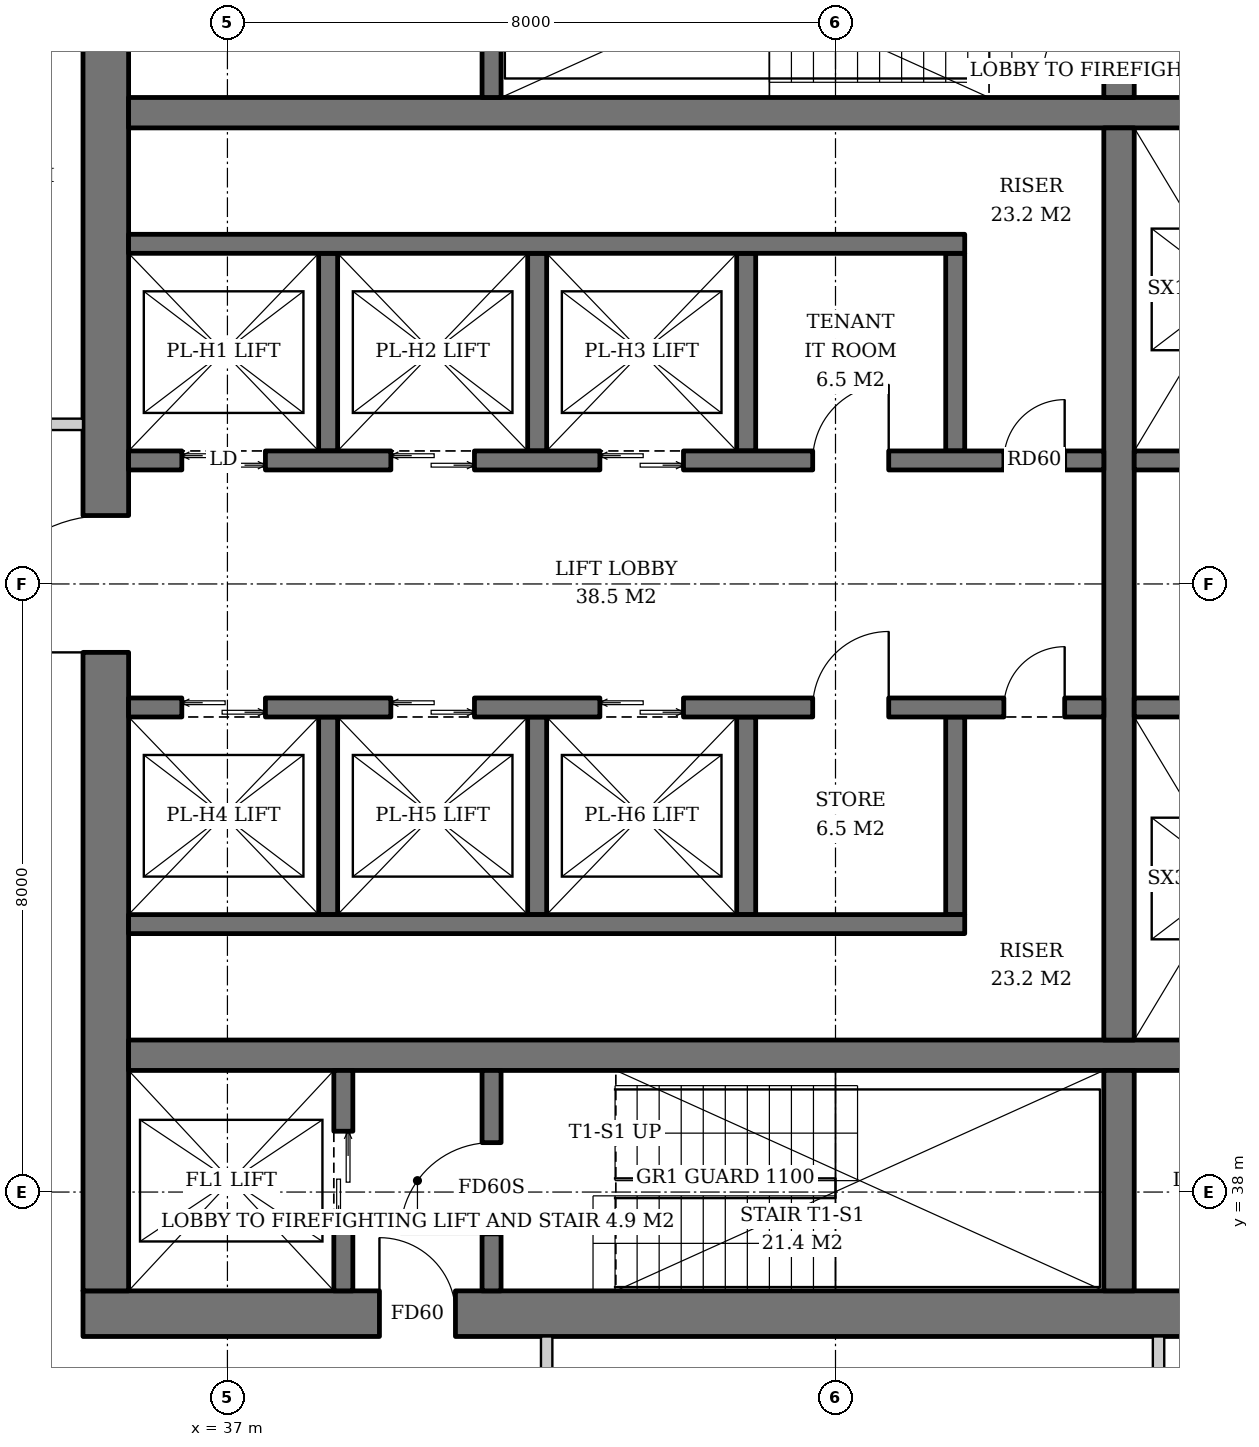
"""IFC4 building model, lengths in metres.
Left out: names, types, materials, properties, quantities, classifications, styles, units other than length and angle.
Written with IfcOpenShell. Run it as: python <this file> out.ifc"""

import sys

from ifc_helpers import new_model, si_unit, direction, frame, frame_2d, origin, place, context, subcontext, project, spatial, rectangle, extrude, element, fill, save


model = new_model("IFC4")
c1 = context("Model", 3, precision=1e-05, world=origin(), true_north=direction((0.0, 1.0)))
c2 = subcontext(c1, "Body", "Model", "MODEL_VIEW")
j1 = project(units=[si_unit("LENGTHUNIT", "METRE"), si_unit("PLANEANGLEUNIT", "RADIAN")], contexts=[c1])
p1 = place(None, origin())
s1 = spatial("IfcSite", under=j1, at=p1, CompositionType="ELEMENT")
p2 = place(p1, origin())
s2 = spatial("IfcBuilding", under=s1, at=p2, CompositionType="ELEMENT")
p3 = place(p2, frame((0.0, 0.0, 203.4)))
s3 = spatial("IfcBuildingStorey", under=s2, at=p3, CompositionType="ELEMENT", Elevation=203.4)
p4 = place(p3, frame((35.1, 36.4, 0.0), z_axis=(0.0, 0.0, 1.0), x_axis=(1.0, 0.0, 0.0)))
e1 = element("IfcWall", 1, at=p4, inside=s3, PredefinedType="SHEAR", context=c2, shape_type="SweptSolid", body=[
    extrude(rectangle(XDim=19.8, YDim=0.6, at=frame_2d((9.9, 0.0))), origin(), (0.0, 0.0, 1.0), 3.8),
])
p5 = place(p4, frame((3.9, 0.0, 0.0)))
e2 = element("IfcOpeningElement", 2, at=p5, cuts=e1, PredefinedType="OPENING", context=c2, shape_type="SweptSolid", body=[
    extrude(rectangle(XDim=1.0, YDim=2.1, at=frame_2d((0.5, 1.05))), frame((0.0, 0.31, 0.0), z_axis=(0.0, -1.0, 0.0), x_axis=(1.0, 0.0, 0.0)), (0.0, 0.0, 1.0), 0.62),
])
p6 = place(p4, frame((15.35, 0.0, 0.0)))
e3 = element("IfcOpeningElement", 3, at=p6, cuts=e1, PredefinedType="OPENING", context=c2, shape_type="SweptSolid", body=[
    extrude(rectangle(XDim=1.0, YDim=2.1, at=frame_2d((0.5, 1.05))), frame((0.0, 0.31, 0.0), z_axis=(0.0, -1.0, 0.0), x_axis=(1.0, 0.0, 0.0)), (0.0, 0.0, 1.0), 0.62),
])
p7 = place(p3, frame((35.4, 36.7, 0.0), z_axis=(0.0, 0.0, 1.0), x_axis=(0.0, 1.0, 0.0)))
e4 = element("IfcWall", 4, at=p7, inside=s3, PredefinedType="SHEAR", context=c2, shape_type="SweptSolid", body=[
    extrude(rectangle(XDim=18.6, YDim=0.6, at=frame_2d((9.3, 0.0))), origin(), (0.0, 0.0, 1.0), 3.8),
])
p8 = place(p7, frame((8.4, 0.0, 0.0)))
e5 = element("IfcOpeningElement", 5, at=p8, cuts=e4, PredefinedType="OPENING", context=c2, shape_type="SweptSolid", body=[
    extrude(rectangle(XDim=1.8, YDim=2.4, at=frame_2d((0.9, 1.2))), frame((0.0, 0.31, 0.0), z_axis=(0.0, -1.0, 0.0), x_axis=(1.0, 0.0, 0.0)), (0.0, 0.0, 1.0), 0.62),
])
for number, where, z_axis, x_axis in (
    (6, (35.7, 39.8, 0.0), (0.0, 0.0, 1.0), (1.0, 0.0, 0.0)),
    (7, (35.7, 52.2, 0.0), (0.0, 0.0, 1.0), (1.0, 0.0, 0.0)),
):
    element("IfcWall", number, at=place(p3, frame(where, z_axis=z_axis, x_axis=x_axis)), inside=s3, PredefinedType="SHEAR", context=c2, shape_type="SweptSolid", body=[
        extrude(rectangle(XDim=18.6, YDim=0.4, at=frame_2d((9.3, 0.0))), origin(), (0.0, 0.0, 1.0), 3.8),
    ])
p9 = place(p3, frame((48.73, 36.7, 0.0), z_axis=(0.0, 0.0, 1.0), x_axis=(0.0, 1.0, 0.0)))
e8 = element("IfcWall", 8, at=p9, inside=s3, PredefinedType="SHEAR", context=c2, shape_type="SweptSolid", body=[
    extrude(rectangle(XDim=2.9, YDim=0.4, at=frame_2d((1.45, 0.0))), origin(), (0.0, 0.0, 1.0), 3.8),
])
p10 = place(p3, frame((48.73, 40.0, 0.0), z_axis=(0.0, 0.0, 1.0), x_axis=(0.0, 1.0, 0.0)))
e9 = element("IfcWall", 9, at=p10, inside=s3, PredefinedType="SHEAR", context=c2, shape_type="SweptSolid", body=[
    extrude(rectangle(XDim=12.0, YDim=0.4, at=frame_2d((6.0, 0.0))), origin(), (0.0, 0.0, 1.0), 3.8),
])
p11 = place(p3, frame((48.73, 52.4, 0.0), z_axis=(0.0, 0.0, 1.0), x_axis=(0.0, 1.0, 0.0)))
e10 = element("IfcWall", 10, at=p11, inside=s3, PredefinedType="SHEAR", context=c2, shape_type="SweptSolid", body=[
    extrude(rectangle(XDim=2.9, YDim=0.4, at=frame_2d((1.45, 0.0))), origin(), (0.0, 0.0, 1.0), 3.8),
])
p12 = place(p11, frame((0.3, 0.0, 0.0)))
e11 = element("IfcOpeningElement", 11, at=p12, cuts=e10, PredefinedType="OPENING", context=c2, shape_type="SweptSolid", body=[
    extrude(rectangle(XDim=1.0, YDim=2.1, at=frame_2d((0.5, 1.05))), frame((0.0, 0.21, 0.0), z_axis=(0.0, -1.0, 0.0), x_axis=(1.0, 0.0, 0.0)), (0.0, 0.0, 1.0), 0.42),
])
p13 = place(p3, frame((38.525, 36.7, 0.0), z_axis=(0.0, 0.0, 1.0), x_axis=(0.0, 1.0, 0.0)))
e12 = element("IfcWall", 12, at=p13, inside=s3, PredefinedType="SHEAR", context=c2, shape_type="SweptSolid", body=[
    extrude(rectangle(XDim=2.9, YDim=0.25, at=frame_2d((1.45, 0.0))), origin(), (0.0, 0.0, 1.0), 3.8),
])
p14 = place(p13, frame((0.8, 0.0, 0.0)))
e13 = element("IfcOpeningElement", 13, at=p14, cuts=e12, PredefinedType="OPENING", context=c2, shape_type="SweptSolid", body=[
    extrude(rectangle(XDim=1.3, YDim=2.2, at=frame_2d((0.65, 1.1))), frame((0.0, 0.135, 0.0), z_axis=(0.0, -1.0, 0.0), x_axis=(1.0, 0.0, 0.0)), (0.0, 0.0, 1.0), 0.27),
])
p15 = place(p3, frame((40.475, 36.7, 0.0), z_axis=(0.0, 0.0, 1.0), x_axis=(0.0, 1.0, 0.0)))
e14 = element("IfcWall", 14, at=p15, inside=s3, PredefinedType="SHEAR", context=c2, shape_type="SweptSolid", body=[
    extrude(rectangle(XDim=2.9, YDim=0.25, at=frame_2d((1.45, 0.0))), origin(), (0.0, 0.0, 1.0), 3.8),
])
p16 = place(p15, frame((0.75, 0.0, 0.0)))
e15 = element("IfcOpeningElement", 15, at=p16, cuts=e14, PredefinedType="OPENING", context=c2, shape_type="SweptSolid", body=[
    extrude(rectangle(XDim=1.2, YDim=2.1, at=frame_2d((0.6, 1.05))), frame((0.0, 0.135, 0.0), z_axis=(0.0, -1.0, 0.0), x_axis=(1.0, 0.0, 0.0)), (0.0, 0.0, 1.0), 0.27),
])
p17 = place(p3, frame((40.475, 52.4, 0.0), z_axis=(0.0, 0.0, 1.0), x_axis=(0.0, 1.0, 0.0)))
e16 = element("IfcWall", 16, at=p17, inside=s3, PredefinedType="SHEAR", context=c2, shape_type="SweptSolid", body=[
    extrude(rectangle(XDim=2.9, YDim=0.25, at=frame_2d((1.45, 0.0))), origin(), (0.0, 0.0, 1.0), 3.8),
])
for number, where, z_axis, x_axis in (
    (17, (38.325, 47.75, 0.0), (0.0, 0.0, 1.0), (0.0, 1.0, 0.0)),
    (18, (41.075, 47.75, 0.0), (0.0, 0.0, 1.0), (0.0, 1.0, 0.0)),
    (19, (43.825, 47.75, 0.0), (0.0, 0.0, 1.0), (0.0, 1.0, 0.0)),
    (20, (46.575, 47.75, 0.0), (0.0, 0.0, 1.0), (0.0, 1.0, 0.0)),
):
    element("IfcWall", number, at=place(p3, frame(where, z_axis=z_axis, x_axis=x_axis)), inside=s3, PredefinedType="SHEAR", context=c2, shape_type="SweptSolid", body=[
        extrude(rectangle(XDim=2.6, YDim=0.25, at=frame_2d((1.3, 0.0))), origin(), (0.0, 0.0, 1.0), 3.8),
    ])
p18 = place(p3, frame((35.7, 50.475, 0.0), z_axis=(0.0, 0.0, 1.0), x_axis=(1.0, 0.0, 0.0)))
e21 = element("IfcWall", 21, at=p18, inside=s3, PredefinedType="SHEAR", context=c2, shape_type="SweptSolid", body=[
    extrude(rectangle(XDim=11.0, YDim=0.25, at=frame_2d((5.5, 0.0))), origin(), (0.0, 0.0, 1.0), 3.8),
])
p19 = place(p3, frame((35.7, 47.625, 0.0), z_axis=(0.0, 0.0, 1.0), x_axis=(1.0, 0.0, 0.0)))
e22 = element("IfcWall", 22, at=p19, inside=s3, PredefinedType="SHEAR", context=c2, shape_type="SweptSolid", body=[
    extrude(rectangle(XDim=12.83, YDim=0.25, at=frame_2d((6.415, 0.0))), origin(), (0.0, 0.0, 1.0), 3.8),
])
p20 = place(p19, frame((0.7, 0.0, 0.0)))
e23 = element("IfcOpeningElement", 23, at=p20, cuts=e22, PredefinedType="OPENING", context=c2, shape_type="SweptSolid", body=[
    extrude(rectangle(XDim=1.1, YDim=2.2, at=frame_2d((0.55, 1.1))), frame((0.0, 0.135, 0.0), z_axis=(0.0, -1.0, 0.0), x_axis=(1.0, 0.0, 0.0)), (0.0, 0.0, 1.0), 0.27),
])
p21 = place(p19, frame((3.45, 0.0, 0.0)))
e24 = element("IfcOpeningElement", 24, at=p21, cuts=e22, PredefinedType="OPENING", context=c2, shape_type="SweptSolid", body=[
    extrude(rectangle(XDim=1.1, YDim=2.2, at=frame_2d((0.55, 1.1))), frame((0.0, 0.135, 0.0), z_axis=(0.0, -1.0, 0.0), x_axis=(1.0, 0.0, 0.0)), (0.0, 0.0, 1.0), 0.27),
])
p22 = place(p19, frame((6.2, 0.0, 0.0)))
e25 = element("IfcOpeningElement", 25, at=p22, cuts=e22, PredefinedType="OPENING", context=c2, shape_type="SweptSolid", body=[
    extrude(rectangle(XDim=1.1, YDim=2.2, at=frame_2d((0.55, 1.1))), frame((0.0, 0.135, 0.0), z_axis=(0.0, -1.0, 0.0), x_axis=(1.0, 0.0, 0.0)), (0.0, 0.0, 1.0), 0.27),
])
p23 = place(p19, frame((9.0, 0.0, 0.0)))
e26 = element("IfcOpeningElement", 26, at=p23, cuts=e22, PredefinedType="OPENING", context=c2, shape_type="SweptSolid", body=[
    extrude(rectangle(XDim=1.0, YDim=2.1, at=frame_2d((0.5, 1.05))), frame((0.0, 0.135, 0.0), z_axis=(0.0, -1.0, 0.0), x_axis=(1.0, 0.0, 0.0)), (0.0, 0.0, 1.0), 0.27),
])
p24 = place(p19, frame((11.515, 0.0, 0.0)))
e27 = element("IfcOpeningElement", 27, at=p24, cuts=e22, PredefinedType="OPENING", context=c2, shape_type="SweptSolid", body=[
    extrude(rectangle(XDim=0.8, YDim=2.0, at=frame_2d((0.4, 1.0))), frame((0.0, 0.135, 0.0), z_axis=(0.0, -1.0, 0.0), x_axis=(1.0, 0.0, 0.0)), (0.0, 0.0, 1.0), 0.27),
])
for number, where, z_axis, x_axis in (
    (28, (38.325, 44.25, 0.0), (0.0, 0.0, 1.0), (0.0, -1.0, 0.0)),
    (29, (41.075, 44.25, 0.0), (0.0, 0.0, 1.0), (0.0, -1.0, 0.0)),
    (30, (43.825, 44.25, 0.0), (0.0, 0.0, 1.0), (0.0, -1.0, 0.0)),
    (31, (46.575, 44.25, 0.0), (0.0, 0.0, 1.0), (0.0, -1.0, 0.0)),
):
    element("IfcWall", number, at=place(p3, frame(where, z_axis=z_axis, x_axis=x_axis)), inside=s3, PredefinedType="SHEAR", context=c2, shape_type="SweptSolid", body=[
        extrude(rectangle(XDim=2.6, YDim=0.25, at=frame_2d((1.3, 0.0))), origin(), (0.0, 0.0, 1.0), 3.8),
    ])
p25 = place(p3, frame((35.7, 41.525, 0.0), z_axis=(0.0, 0.0, 1.0), x_axis=(1.0, 0.0, 0.0)))
e32 = element("IfcWall", 32, at=p25, inside=s3, PredefinedType="SHEAR", context=c2, shape_type="SweptSolid", body=[
    extrude(rectangle(XDim=11.0, YDim=0.25, at=frame_2d((5.5, 0.0))), origin(), (0.0, 0.0, 1.0), 3.8),
])
p26 = place(p3, frame((35.7, 44.375, 0.0), z_axis=(0.0, 0.0, 1.0), x_axis=(1.0, 0.0, 0.0)))
e33 = element("IfcWall", 33, at=p26, inside=s3, PredefinedType="SHEAR", context=c2, shape_type="SweptSolid", body=[
    extrude(rectangle(XDim=12.83, YDim=0.25, at=frame_2d((6.415, 0.0))), origin(), (0.0, 0.0, 1.0), 3.8),
])
p27 = place(p26, frame((0.7, 0.0, 0.0)))
e34 = element("IfcOpeningElement", 34, at=p27, cuts=e33, PredefinedType="OPENING", context=c2, shape_type="SweptSolid", body=[
    extrude(rectangle(XDim=1.1, YDim=2.2, at=frame_2d((0.55, 1.1))), frame((0.0, 0.135, 0.0), z_axis=(0.0, -1.0, 0.0), x_axis=(1.0, 0.0, 0.0)), (0.0, 0.0, 1.0), 0.27),
])
p28 = place(p26, frame((3.45, 0.0, 0.0)))
e35 = element("IfcOpeningElement", 35, at=p28, cuts=e33, PredefinedType="OPENING", context=c2, shape_type="SweptSolid", body=[
    extrude(rectangle(XDim=1.1, YDim=2.2, at=frame_2d((0.55, 1.1))), frame((0.0, 0.135, 0.0), z_axis=(0.0, -1.0, 0.0), x_axis=(1.0, 0.0, 0.0)), (0.0, 0.0, 1.0), 0.27),
])
p29 = place(p26, frame((6.2, 0.0, 0.0)))
e36 = element("IfcOpeningElement", 36, at=p29, cuts=e33, PredefinedType="OPENING", context=c2, shape_type="SweptSolid", body=[
    extrude(rectangle(XDim=1.1, YDim=2.2, at=frame_2d((0.55, 1.1))), frame((0.0, 0.135, 0.0), z_axis=(0.0, -1.0, 0.0), x_axis=(1.0, 0.0, 0.0)), (0.0, 0.0, 1.0), 0.27),
])
p30 = place(p26, frame((9.0, 0.0, 0.0)))
e37 = element("IfcOpeningElement", 37, at=p30, cuts=e33, PredefinedType="OPENING", context=c2, shape_type="SweptSolid", body=[
    extrude(rectangle(XDim=1.0, YDim=2.1, at=frame_2d((0.5, 1.05))), frame((0.0, 0.135, 0.0), z_axis=(0.0, -1.0, 0.0), x_axis=(1.0, 0.0, 0.0)), (0.0, 0.0, 1.0), 0.27),
])
p31 = place(p26, frame((11.515, 0.0, 0.0)))
e38 = element("IfcOpeningElement", 38, at=p31, cuts=e33, PredefinedType="OPENING", context=c2, shape_type="SweptSolid", body=[
    extrude(rectangle(XDim=0.8, YDim=2.0, at=frame_2d((0.4, 1.0))), frame((0.0, 0.135, 0.0), z_axis=(0.0, -1.0, 0.0), x_axis=(1.0, 0.0, 0.0)), (0.0, 0.0, 1.0), 0.27),
])
for number, where, z_axis, x_axis in (
    (39, (48.93, 47.625, 0.0), (0.0, 0.0, 1.0), (1.0, 0.0, 0.0)),
    (40, (48.93, 44.375, 0.0), (0.0, 0.0, 1.0), (1.0, 0.0, 0.0)),
):
    element("IfcWall", number, at=place(p3, frame(where, z_axis=z_axis, x_axis=x_axis)), inside=s3, PredefinedType="SHEAR", context=c2, shape_type="SweptSolid", body=[
        extrude(rectangle(XDim=5.37, YDim=0.25, at=frame_2d((2.685, 0.0))), origin(), (0.0, 0.0, 1.0), 3.8),
    ])
for number, where, z_axis, x_axis in (
    (41, (35.1, 48.1, 0.0), (0.0, 0.0, 1.0), (-1.0, 0.0, 0.0)),
    (42, (41.2, 36.1, 0.0), (0.0, 0.0, 1.0), (0.0, -1.0, 0.0)),
    (43, (49.25, 36.1, 0.0), (0.0, 0.0, 1.0), (0.0, -1.0, 0.0)),
):
    element("IfcWall", number, at=place(p3, frame(where, z_axis=z_axis, x_axis=x_axis)), inside=s3, PredefinedType="PARTITIONING", context=c2, shape_type="SweptSolid", body=[
        extrude(rectangle(XDim=2.925, YDim=0.15, at=frame_2d((1.462, 0.0))), origin(), (0.0, 0.0, 1.0), 3.62),
    ])
p32 = place(p14, origin())
e44 = element("IfcDoor", 44, at=p32, inside=s3, OperationType="DOUBLE_DOOR_SLIDING", PredefinedType="DOOR", context=c2, shape_type="SweptSolid", body=[
    extrude(rectangle(XDim=1.3, YDim=2.2, at=frame_2d((0.65, 1.1))), frame((0.0, 0.025, 0.0), z_axis=(0.0, -1.0, 0.0), x_axis=(1.0, 0.0, 0.0)), (0.0, 0.0, 1.0), 0.05),
])
fill(e13, e44)
p33 = place(p16, origin())
e45 = element("IfcDoor", 45, at=p33, inside=s3, OperationType="SINGLE_SWING_LEFT", PredefinedType="DOOR", context=c2, shape_type="SweptSolid", body=[
    extrude(rectangle(XDim=1.2, YDim=2.1, at=frame_2d((0.6, 1.05))), frame((0.0, 0.025, 0.0), z_axis=(0.0, -1.0, 0.0), x_axis=(1.0, 0.0, 0.0)), (0.0, 0.0, 1.0), 0.05),
])
fill(e15, e45)
p34 = place(p20, origin())
e46 = element("IfcDoor", 46, at=p34, inside=s3, OperationType="DOUBLE_DOOR_SLIDING", PredefinedType="DOOR", context=c2, shape_type="SweptSolid", body=[
    extrude(rectangle(XDim=1.1, YDim=2.2, at=frame_2d((0.55, 1.1))), frame((0.0, 0.025, 0.0), z_axis=(0.0, -1.0, 0.0), x_axis=(1.0, 0.0, 0.0)), (0.0, 0.0, 1.0), 0.05),
])
fill(e23, e46)
p35 = place(p21, origin())
e47 = element("IfcDoor", 47, at=p35, inside=s3, OperationType="DOUBLE_DOOR_SLIDING", PredefinedType="DOOR", context=c2, shape_type="SweptSolid", body=[
    extrude(rectangle(XDim=1.1, YDim=2.2, at=frame_2d((0.55, 1.1))), frame((0.0, 0.025, 0.0), z_axis=(0.0, -1.0, 0.0), x_axis=(1.0, 0.0, 0.0)), (0.0, 0.0, 1.0), 0.05),
])
fill(e24, e47)
p36 = place(p22, origin())
e48 = element("IfcDoor", 48, at=p36, inside=s3, OperationType="DOUBLE_DOOR_SLIDING", PredefinedType="DOOR", context=c2, shape_type="SweptSolid", body=[
    extrude(rectangle(XDim=1.1, YDim=2.2, at=frame_2d((0.55, 1.1))), frame((0.0, 0.025, 0.0), z_axis=(0.0, -1.0, 0.0), x_axis=(1.0, 0.0, 0.0)), (0.0, 0.0, 1.0), 0.05),
])
fill(e25, e48)
p37 = place(p23, origin())
e49 = element("IfcDoor", 49, at=p37, inside=s3, OperationType="SINGLE_SWING_RIGHT", PredefinedType="DOOR", context=c2, shape_type="SweptSolid", body=[
    extrude(rectangle(XDim=1.0, YDim=2.1, at=frame_2d((0.5, 1.05))), frame((0.0, 0.025, 0.0), z_axis=(0.0, -1.0, 0.0), x_axis=(1.0, 0.0, 0.0)), (0.0, 0.0, 1.0), 0.05),
])
fill(e26, e49)
p38 = place(p24, origin())
e50 = element("IfcDoor", 50, at=p38, inside=s3, OperationType="SINGLE_SWING_RIGHT", PredefinedType="DOOR", context=c2, shape_type="SweptSolid", body=[
    extrude(rectangle(XDim=0.8, YDim=2.0, at=frame_2d((0.4, 1.0))), frame((0.0, 0.025, 0.0), z_axis=(0.0, -1.0, 0.0), x_axis=(1.0, 0.0, 0.0)), (0.0, 0.0, 1.0), 0.05),
])
fill(e27, e50)
p39 = place(p27, origin())
e51 = element("IfcDoor", 51, at=p39, inside=s3, OperationType="DOUBLE_DOOR_SLIDING", PredefinedType="DOOR", context=c2, shape_type="SweptSolid", body=[
    extrude(rectangle(XDim=1.1, YDim=2.2, at=frame_2d((0.55, 1.1))), frame((0.0, 0.025, 0.0), z_axis=(0.0, -1.0, 0.0), x_axis=(1.0, 0.0, 0.0)), (0.0, 0.0, 1.0), 0.05),
])
fill(e34, e51)
p40 = place(p28, origin())
e52 = element("IfcDoor", 52, at=p40, inside=s3, OperationType="DOUBLE_DOOR_SLIDING", PredefinedType="DOOR", context=c2, shape_type="SweptSolid", body=[
    extrude(rectangle(XDim=1.1, YDim=2.2, at=frame_2d((0.55, 1.1))), frame((0.0, 0.025, 0.0), z_axis=(0.0, -1.0, 0.0), x_axis=(1.0, 0.0, 0.0)), (0.0, 0.0, 1.0), 0.05),
])
fill(e35, e52)
p41 = place(p29, origin())
e53 = element("IfcDoor", 53, at=p41, inside=s3, OperationType="DOUBLE_DOOR_SLIDING", PredefinedType="DOOR", context=c2, shape_type="SweptSolid", body=[
    extrude(rectangle(XDim=1.1, YDim=2.2, at=frame_2d((0.55, 1.1))), frame((0.0, 0.025, 0.0), z_axis=(0.0, -1.0, 0.0), x_axis=(1.0, 0.0, 0.0)), (0.0, 0.0, 1.0), 0.05),
])
fill(e36, e53)
p42 = place(p30, origin())
e54 = element("IfcDoor", 54, at=p42, inside=s3, OperationType="SINGLE_SWING_RIGHT", PredefinedType="DOOR", context=c2, shape_type="SweptSolid", body=[
    extrude(rectangle(XDim=1.0, YDim=2.1, at=frame_2d((0.5, 1.05))), frame((0.0, 0.025, 0.0), z_axis=(0.0, -1.0, 0.0), x_axis=(1.0, 0.0, 0.0)), (0.0, 0.0, 1.0), 0.05),
])
fill(e37, e54)
p43 = place(p31, origin())
e55 = element("IfcDoor", 55, at=p43, inside=s3, OperationType="SINGLE_SWING_RIGHT", PredefinedType="DOOR", context=c2, shape_type="SweptSolid", body=[
    extrude(rectangle(XDim=0.8, YDim=2.0, at=frame_2d((0.4, 1.0))), frame((0.0, 0.025, 0.0), z_axis=(0.0, -1.0, 0.0), x_axis=(1.0, 0.0, 0.0)), (0.0, 0.0, 1.0), 0.05),
])
fill(e38, e55)
p44 = place(p12, origin())
e56 = element("IfcDoor", 56, at=p44, inside=s3, OperationType="SINGLE_SWING_LEFT", PredefinedType="DOOR", context=c2, shape_type="SweptSolid", body=[
    extrude(rectangle(XDim=1.0, YDim=2.1, at=frame_2d((0.5, 1.05))), frame((0.0, 0.025, 0.0), z_axis=(0.0, -1.0, 0.0), x_axis=(1.0, 0.0, 0.0)), (0.0, 0.0, 1.0), 0.05),
])
fill(e11, e56)
p45 = place(p5, origin())
e57 = element("IfcDoor", 57, at=p45, inside=s3, OperationType="SINGLE_SWING_LEFT", PredefinedType="DOOR", context=c2, shape_type="SweptSolid", body=[
    extrude(rectangle(XDim=1.0, YDim=2.1, at=frame_2d((0.5, 1.05))), frame((0.0, 0.025, 0.0), z_axis=(0.0, -1.0, 0.0), x_axis=(1.0, 0.0, 0.0)), (0.0, 0.0, 1.0), 0.05),
])
fill(e2, e57)
p46 = place(p8, origin())
e58 = element("IfcDoor", 58, at=p46, inside=s3, OperationType="DOUBLE_DOOR_SINGLE_SWING", PredefinedType="DOOR", context=c2, shape_type="SweptSolid", body=[
    extrude(rectangle(XDim=1.8, YDim=2.4, at=frame_2d((0.9, 1.2))), frame((0.0, 0.025, 0.0), z_axis=(0.0, -1.0, 0.0), x_axis=(1.0, 0.0, 0.0)), (0.0, 0.0, 1.0), 0.05),
])
fill(e5, e58)
save(model, sys.argv[1])
